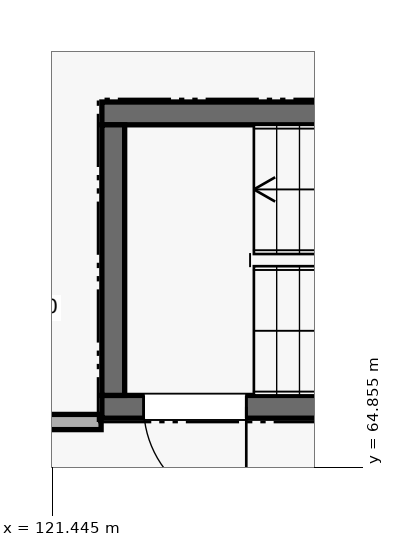
"""IFC4 building model, lengths in metres.
Left out: names, types, materials, properties, quantities, classifications, styles, units other than length and angle.
Written with IfcOpenShell. Run it as: python <this file> out.ifc"""

import sys

from ifc_helpers import new_model, si_unit, direction, frame, frame_2d, origin, place, context, subcontext, project, spatial, rectangle, extrude, element, fill, save


model = new_model("IFC4")
c1 = context("Model", 3, precision=1e-05, world=origin(), true_north=direction((0.0, 1.0)))
c2 = subcontext(c1, "Body", "Model", "MODEL_VIEW")
j1 = project(units=[si_unit("LENGTHUNIT", "METRE"), si_unit("PLANEANGLEUNIT", "RADIAN")], contexts=[c1])
p1 = place(None, origin())
s1 = spatial("IfcSite", under=j1, at=p1, CompositionType="ELEMENT")
p2 = place(p1, origin())
s2 = spatial("IfcBuilding", under=s1, at=p2, CompositionType="ELEMENT")
p3 = place(p2, origin())
s3 = spatial("IfcBuildingStorey", under=s2, at=p3, CompositionType="ELEMENT", Elevation=0.0)
p4 = place(p3, frame((122.1, 65.65, 0.0), z_axis=(0.0, 0.0, 1.0), x_axis=(1.0, 0.0, 0.0)))
e1 = element("IfcWall", 1, at=p4, inside=s3, PredefinedType="SHEAR", context=c2, shape_type="SweptSolid", body=[
    extrude(rectangle(XDim=8.65, YDim=0.3, at=frame_2d((4.325, 0.0))), origin(), (0.0, 0.0, 1.0), 5.1),
])
p5 = place(p4, frame((0.55, 0.0, 0.0)))
e2 = element("IfcOpeningElement", 2, at=p5, cuts=e1, PredefinedType="OPENING", context=c2, shape_type="SweptSolid", body=[
    extrude(rectangle(XDim=1.35, YDim=2.2, at=frame_2d((0.675, 1.1))), frame((0.0, 0.16, 0.0), z_axis=(0.0, -1.0, 0.0), x_axis=(1.0, 0.0, 0.0)), (0.0, 0.0, 1.0), 0.32),
])
p6 = place(p3, frame((130.75, 69.51, 0.0), z_axis=(0.0, 0.0, 1.0), x_axis=(-1.0, 0.0, 0.0)))
e3 = element("IfcWall", 3, at=p6, inside=s3, PredefinedType="SHEAR", context=c2, shape_type="SweptSolid", body=[
    extrude(rectangle(XDim=8.65, YDim=0.3, at=frame_2d((4.325, 0.0))), origin(), (0.0, 0.0, 1.0), 5.1),
])
p7 = place(p3, frame((122.25, 69.36, 0.0), z_axis=(0.0, 0.0, 1.0), x_axis=(0.0, -1.0, 0.0)))
e4 = element("IfcWall", 4, at=p7, inside=s3, PredefinedType="SHEAR", context=c2, shape_type="SweptSolid", body=[
    extrude(rectangle(XDim=3.56, YDim=0.3, at=frame_2d((1.78, 0.0))), origin(), (0.0, 0.0, 1.0), 5.1),
])
p8 = place(p3, frame((106.05, 65.45, 0.0), z_axis=(0.0, 0.0, 1.0), x_axis=(1.0, 0.0, 0.0)))
e5 = element("IfcWall", 5, at=p8, inside=s3, PredefinedType="PARTITIONING", context=c2, shape_type="SweptSolid", body=[
    extrude(rectangle(XDim=16.04, YDim=0.2, at=frame_2d((8.02, 0.0))), origin(), (0.0, 0.0, 1.0), 4.483),
])
p9 = place(p8, frame((6.8, 0.0, 0.0)))
e6 = element("IfcOpeningElement", 6, at=p9, cuts=e5, PredefinedType="OPENING", context=c2, shape_type="SweptSolid", body=[
    extrude(rectangle(XDim=1.45, YDim=2.3, at=frame_2d((0.725, 1.15))), frame((0.0, 0.11, 0.0), z_axis=(0.0, -1.0, 0.0), x_axis=(1.0, 0.0, 0.0)), (0.0, 0.0, 1.0), 0.22),
])
p10 = place(p5, frame((1.35, 0.0, 0.0), z_axis=(0.0, 0.0, 1.0), x_axis=(-1.0, 0.0, 0.0)))
e7 = element("IfcDoor", 7, at=p10, inside=s3, OperationType="SINGLE_SWING_LEFT", PredefinedType="DOOR", context=c2, shape_type="SweptSolid", body=[
    extrude(rectangle(XDim=1.35, YDim=2.2, at=frame_2d((0.675, 1.1))), frame((0.0, 0.025, 0.0), z_axis=(0.0, -1.0, 0.0), x_axis=(1.0, 0.0, 0.0)), (0.0, 0.0, 1.0), 0.05),
])
fill(e2, e7)
save(model, sys.argv[1])
